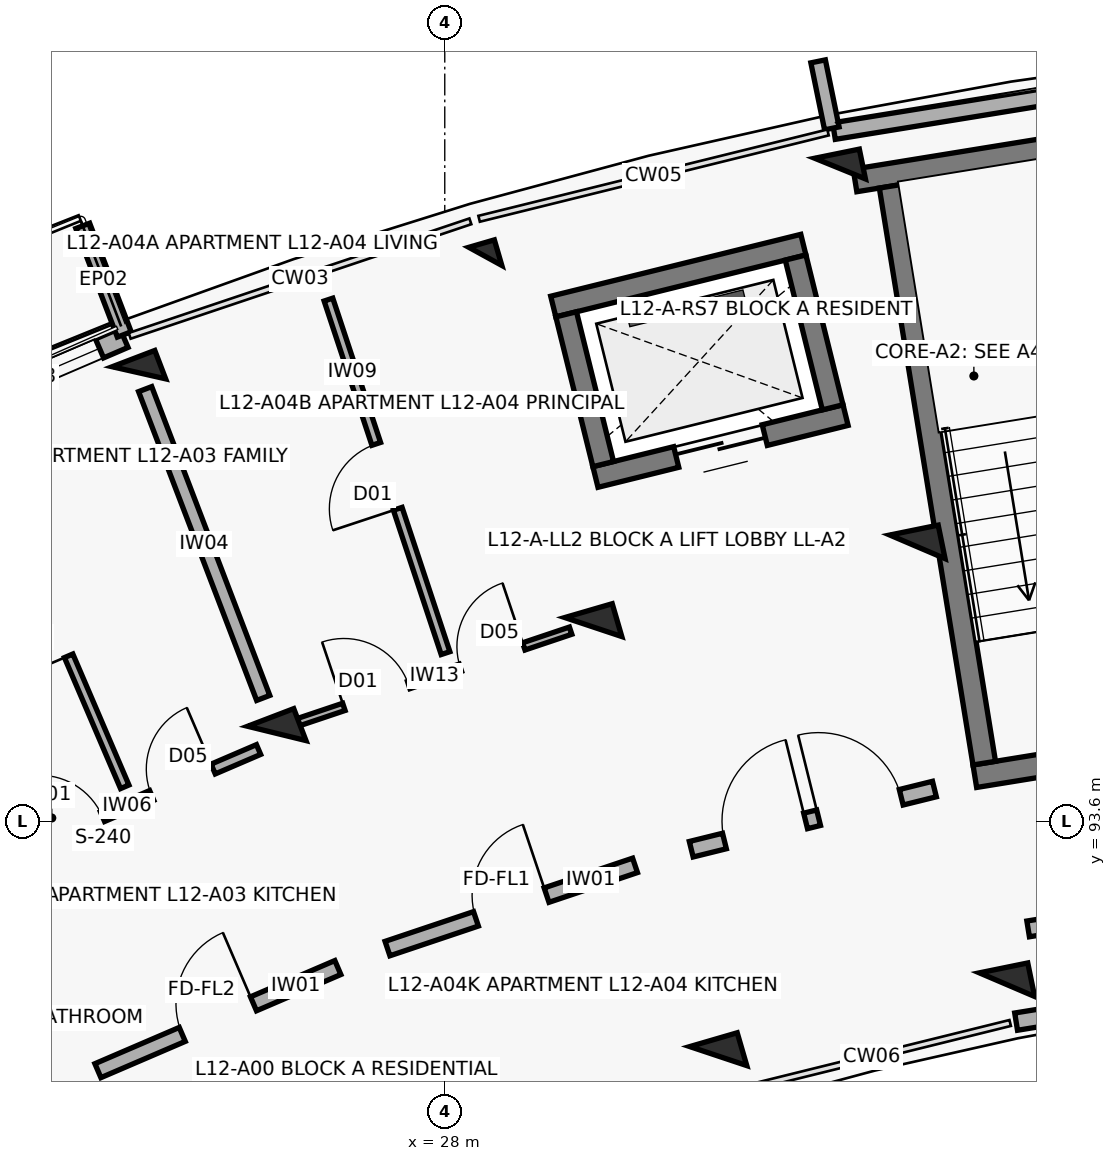
"""IFC4 building model, lengths in metres.
Left out: names, types, materials, properties, quantities, classifications, styles, units other than length and angle.
Written with IfcOpenShell. Run it as: python <this file> out.ifc"""

import sys

from ifc_helpers import new_model, si_unit, direction, frame, frame_2d, origin, origin_2d, place, context, subcontext, project, spatial, rectangle, extrude, element, fill, save


model = new_model("IFC4")
c1 = context("Model", 3, precision=1e-05, world=origin(), true_north=direction((0.0, 1.0)))
c2 = subcontext(c1, "Body", "Model", "MODEL_VIEW")
j1 = project(units=[si_unit("LENGTHUNIT", "METRE"), si_unit("PLANEANGLEUNIT", "RADIAN")], contexts=[c1])
p1 = place(None, origin())
s1 = spatial("IfcSite", under=j1, at=p1, CompositionType="ELEMENT")
p2 = place(p1, origin())
s2 = spatial("IfcBuilding", under=s1, at=p2, CompositionType="ELEMENT")
p3 = place(p2, frame((0.0, 0.0, 39.1)))
s3 = spatial("IfcBuildingStorey", under=s2, at=p3, CompositionType="ELEMENT", Elevation=39.1)
p4 = place(p3, frame((25.79, 94.753, 0.0), z_axis=(0.0, 0.0, 1.0), x_axis=(-0.357064076459, 0.934079892355, 0.0)))
e1 = element("IfcColumn", 1, at=p4, inside=s3, PredefinedType="COLUMN", context=c2, shape_type="SweptSolid", body=[
    extrude(rectangle(XDim=0.45, YDim=0.65, at=origin_2d()), origin(), (0.0, 0.0, 1.0), 3.1),
])
p5 = place(p3, frame((23.976, 99.499, 0.0), z_axis=(0.0, 0.0, 1.0), x_axis=(-0.357064076459, 0.934079892355, 0.0)))
e2 = element("IfcColumn", 2, at=p5, inside=s3, PredefinedType="COLUMN", context=c2, shape_type="SweptSolid", body=[
    extrude(rectangle(XDim=0.4, YDim=0.6, at=origin_2d()), origin(), (0.0, 0.0, 1.0), 3.1),
])
for number, where, z_axis, x_axis in (
    (3, (31.599, 90.508, 0.0), (0.0, 0.0, 1.0), (-0.28, 0.96, 0.0)),
    (4, (29.954, 96.153, 0.0), (0.0, 0.0, 1.0), (-0.28, 0.96, 0.0)),
):
    element("IfcColumn", number, at=place(p3, frame(where, z_axis=z_axis, x_axis=x_axis)), inside=s3, PredefinedType="COLUMN", context=c2, shape_type="SweptSolid", body=[
        extrude(rectangle(XDim=0.45, YDim=0.65, at=origin_2d()), origin(), (0.0, 0.0, 1.0), 3.1),
    ])
p6 = place(p3, frame((28.533, 101.031, 0.0), z_axis=(0.0, 0.0, 1.0), x_axis=(-0.27966144946, 0.96009867914, 0.0)))
e5 = element("IfcColumn", 5, at=p6, inside=s3, PredefinedType="COLUMN", context=c2, shape_type="SweptSolid", body=[
    extrude(rectangle(XDim=0.35, YDim=0.35, at=origin_2d()), origin(), (0.0, 0.0, 1.0), 3.1),
])
for number, where, z_axis, x_axis in (
    (6, (35.397, 91.448, 0.0), (0.0, 0.0, 1.0), (-0.2, 0.98, 0.0)),
    (7, (34.219, 97.209, 0.0), (0.0, 0.0, 1.0), (-0.2, 0.98, 0.0)),
):
    element("IfcColumn", number, at=place(p3, frame(where, z_axis=z_axis, x_axis=x_axis)), inside=s3, PredefinedType="COLUMN", context=c2, shape_type="SweptSolid", body=[
        extrude(rectangle(XDim=0.45, YDim=0.65, at=origin_2d()), origin(), (0.0, 0.0, 1.0), 3.1),
    ])
p7 = place(p3, frame((33.201, 102.186, 0.0), z_axis=(0.0, 0.0, 1.0), x_axis=(-0.200393999665, 0.979715389742, 0.0)))
e8 = element("IfcColumn", 8, at=p7, inside=s3, PredefinedType="COLUMN", context=c2, shape_type="SweptSolid", body=[
    extrude(rectangle(XDim=0.4, YDim=0.6, at=origin_2d()), origin(), (0.0, 0.0, 1.0), 3.1),
])
p8 = place(p3, frame((19.361, 98.059, 0.0), z_axis=(0.0, 0.0, 1.0), x_axis=(0.918711189033, 0.394930058548, 0.0)))
e9 = element("IfcWall", 9, at=p8, inside=s3, PredefinedType="SOLIDWALL", context=c2, shape_type="SweptSolid", body=[
    extrude(rectangle(XDim=4.809, YDim=0.272, at=frame_2d((2.404, 0.0))), origin(), (0.0, 0.0, 1.0), 2.25),
])
p9 = place(p8, frame((0.4, 0.0, 0.0)))
e10 = element("IfcOpeningElement", 10, at=p9, cuts=e9, PredefinedType="OPENING", context=c2, shape_type="SweptSolid", body=[
    extrude(rectangle(XDim=1.1, YDim=2.15, at=frame_2d((0.55, 1.075))), frame((0.0, 0.146, 0.0), z_axis=(0.0, -1.0, 0.0), x_axis=(1.0, 0.0, 0.0)), (0.0, 0.0, 1.0), 0.292),
])
p10 = place(p8, frame((2.659, 0.0, 0.35)))
e11 = element("IfcOpeningElement", 11, at=p10, cuts=e9, PredefinedType="OPENING", context=c2, shape_type="SweptSolid", body=[
    extrude(rectangle(XDim=1.8, YDim=1.65, at=frame_2d((0.9, 0.825))), frame((0.0, 0.146, 0.0), z_axis=(0.0, -1.0, 0.0), x_axis=(1.0, 0.0, 0.0)), (0.0, 0.0, 1.0), 0.292),
])
p11 = place(p3, frame((23.783, 100.003, 0.0), z_axis=(0.0, 0.0, 1.0), x_axis=(-0.356957296461, 0.934120703391, 0.0)))
e12 = element("IfcWall", 12, at=p11, inside=s3, PredefinedType="PARAPET", context=c2, shape_type="SweptSolid", body=[
    extrude(rectangle(XDim=1.53, YDim=0.195, at=frame_2d((0.765, 0.0))), origin(), (0.0, 0.0, 1.0), 2.25),
])
p12 = place(p3, frame((33.12, 102.679, 0.0), z_axis=(0.0, 0.0, 1.0), x_axis=(0.987080750493, 0.160223568819, 0.0)))
e13 = element("IfcWall", 13, at=p12, inside=s3, PredefinedType="SOLIDWALL", context=c2, shape_type="SweptSolid", body=[
    extrude(rectangle(XDim=4.809, YDim=0.22, at=frame_2d((2.404, 0.0))), origin(), (0.0, 0.0, 1.0), 2.25),
])
p13 = place(p3, frame((33.093, 102.715, 0.0), z_axis=(0.0, 0.0, 1.0), x_axis=(-0.200183211319, 0.979758481416, 0.0)))
e14 = element("IfcWall", 14, at=p13, inside=s3, PredefinedType="PARAPET", context=c2, shape_type="SweptSolid", body=[
    extrude(rectangle(XDim=0.9, YDim=0.195, at=frame_2d((0.45, 0.0))), origin(), (0.0, 0.0, 1.0), 2.25),
])
p14 = place(p3, frame((35.517, 90.961, 0.0), z_axis=(0.0, 0.0, 1.0), x_axis=(0.987080708519, 0.160223827412, 0.0)))
e15 = element("IfcWall", 15, at=p14, inside=s3, PredefinedType="SOLIDWALL", context=c2, shape_type="SweptSolid", body=[
    extrude(rectangle(XDim=3.832, YDim=0.23, at=frame_2d((1.916, 0.0))), origin(), (0.0, 0.0, 1.0), 2.25),
])
p15 = place(p14, frame((1.116, 0.0, 0.32)))
e16 = element("IfcOpeningElement", 16, at=p15, cuts=e15, PredefinedType="OPENING", context=c2, shape_type="SweptSolid", body=[
    extrude(rectangle(XDim=1.6, YDim=1.5, at=frame_2d((0.8, 0.75))), frame((0.0, 0.125, 0.0), z_axis=(0.0, -1.0, 0.0), x_axis=(1.0, 0.0, 0.0)), (0.0, 0.0, 1.0), 0.25),
])
p16 = place(p3, frame((38.794, 94.811, 0.0), z_axis=(0.0, 0.0, 1.0), x_axis=(-0.987077443397, -0.160243941341, 0.0)))
e17 = element("IfcWall", 17, at=p16, inside=s3, PredefinedType="SHEAR", context=c2, shape_type="SweptSolid", body=[
    extrude(rectangle(XDim=3.87, YDim=0.3, at=frame_2d((1.935, 0.0))), origin(), (0.0, 0.0, 1.0), 3.1),
])
p17 = place(p16, frame((1.41, 0.0, 0.0)))
e18 = element("IfcOpeningElement", 18, at=p17, cuts=e17, PredefinedType="OPENING", context=c2, shape_type="SweptSolid", body=[
    extrude(rectangle(XDim=1.05, YDim=2.15, at=frame_2d((0.525, 1.075))), frame((0.0, 0.16, 0.0), z_axis=(0.0, -1.0, 0.0), x_axis=(1.0, 0.0, 0.0)), (0.0, 0.0, 1.0), 0.32),
])
p18 = place(p3, frame((37.81, 102.745, 0.0), z_axis=(0.0, 0.0, 1.0), x_axis=(-0.987084710126, -0.160199173019, 0.0)))
e19 = element("IfcWall", 19, at=p18, inside=s3, PredefinedType="SHEAR", context=c2, shape_type="SweptSolid", body=[
    extrude(rectangle(XDim=4.47, YDim=0.3, at=frame_2d((2.235, 0.0))), origin(), (0.0, 0.0, 1.0), 3.1),
])
p19 = place(p3, frame((35.098, 94.363, 0.0), z_axis=(0.0, 0.0, 1.0), x_axis=(-0.160227496777, 0.987080112897, 0.0)))
e20 = element("IfcWall", 20, at=p19, inside=s3, PredefinedType="SHEAR", context=c2, shape_type="SweptSolid", body=[
    extrude(rectangle(XDim=7.69, YDim=0.3, at=frame_2d((3.845, 0.0))), origin(), (0.0, 0.0, 1.0), 3.1),
])
p20 = place(p3, frame((33.273, 98.942, 0.0), z_axis=(0.0, 0.0, 1.0), x_axis=(-0.970707542441, -0.240264160972, 0.0)))
e21 = element("IfcWall", 21, at=p20, inside=s3, PredefinedType="SHEAR", context=c2, shape_type="SweptSolid", body=[
    extrude(rectangle(XDim=3.39, YDim=0.28, at=frame_2d((1.695, 0.0))), origin(), (0.0, 0.0, 1.0), 3.1),
])
p21 = place(p20, frame((1.095, 0.0, 0.0)))
e22 = element("IfcOpeningElement", 22, at=p21, cuts=e21, PredefinedType="OPENING", context=c2, shape_type="SweptSolid", body=[
    extrude(rectangle(XDim=1.2, YDim=2.15, at=frame_2d((0.6, 1.075))), frame((0.0, 0.15, 0.0), z_axis=(0.0, -1.0, 0.0), x_axis=(1.0, 0.0, 0.0)), (0.0, 0.0, 1.0), 0.3),
])
p22 = place(p3, frame((32.718, 101.185, 0.0), z_axis=(0.0, 0.0, 1.0), x_axis=(-0.970711699588, -0.240247364777, 0.0)))
e23 = element("IfcWall", 23, at=p22, inside=s3, PredefinedType="SHEAR", context=c2, shape_type="SweptSolid", body=[
    extrude(rectangle(XDim=3.39, YDim=0.28, at=frame_2d((1.695, 0.0))), origin(), (0.0, 0.0, 1.0), 3.1),
])
p23 = place(p3, frame((33.104, 99.044, 0.0), z_axis=(0.0, 0.0, 1.0), x_axis=(-0.240186044774, 0.970726873995, 0.0)))
e24 = element("IfcWall", 24, at=p23, inside=s3, PredefinedType="SHEAR", context=c2, shape_type="SweptSolid", body=[
    extrude(rectangle(XDim=2.03, YDim=0.28, at=frame_2d((1.015, 0.0))), origin(), (0.0, 0.0, 1.0), 3.1),
])
p24 = place(p3, frame((30.085, 98.297, 0.0), z_axis=(0.0, 0.0, 1.0), x_axis=(-0.2402993748, 0.970698825832, 0.0)))
e25 = element("IfcWall", 25, at=p24, inside=s3, PredefinedType="SHEAR", context=c2, shape_type="SweptSolid", body=[
    extrude(rectangle(XDim=2.03, YDim=0.28, at=frame_2d((1.015, 0.0))), origin(), (0.0, 0.0, 1.0), 3.1),
])
p25 = place(p3, frame((23.437, 90.316, 0.0), z_axis=(0.0, 0.0, 1.0), x_axis=(0.918718172399, 0.394913813008, 0.0)))
e26 = element("IfcWall", 26, at=p25, inside=s3, PredefinedType="SOLIDWALL", context=c2, shape_type="SweptSolid", body=[
    extrude(rectangle(XDim=3.436, YDim=0.2, at=frame_2d((1.718, 0.0))), origin(), (0.0, 0.0, 1.0), 2.08),
])
p26 = place(p25, frame((1.208, 0.0, 0.0)))
e27 = element("IfcOpeningElement", 27, at=p26, cuts=e26, PredefinedType="OPENING", context=c2, shape_type="SweptSolid", body=[
    extrude(rectangle(XDim=1.02, YDim=2.15, at=frame_2d((0.51, 1.075))), frame((0.0, 0.11, 0.0), z_axis=(0.0, -1.0, 0.0), x_axis=(1.0, 0.0, 0.0)), (0.0, 0.0, 1.0), 0.22),
])
p27 = place(p3, frame((22.073, 93.047, 0.0), z_axis=(0.0, 0.0, 1.0), x_axis=(0.918737522346, 0.394868794707, 0.0)))
e28 = element("IfcWall", 28, at=p27, inside=s3, PredefinedType="PARTITIONING", context=c2, shape_type="SweptSolid", body=[
    extrude(rectangle(XDim=3.785, YDim=0.14, at=frame_2d((1.893, 0.0))), origin(), (0.0, 0.0, 1.0), 2.08),
])
p28 = place(p27, frame((0.65, 0.0, 0.0)))
e29 = element("IfcOpeningElement", 29, at=p28, cuts=e28, PredefinedType="OPENING", context=c2, shape_type="SweptSolid", body=[
    extrude(rectangle(XDim=0.9, YDim=2.1, at=frame_2d((0.45, 1.05))), frame((0.0, 0.08, 0.0), z_axis=(0.0, -1.0, 0.0), x_axis=(1.0, 0.0, 0.0)), (0.0, 0.0, 1.0), 0.16),
])
p29 = place(p27, frame((2.255, 0.0, 0.0)))
e30 = element("IfcOpeningElement", 30, at=p29, cuts=e28, PredefinedType="OPENING", context=c2, shape_type="SweptSolid", body=[
    extrude(rectangle(XDim=0.88, YDim=2.1, at=frame_2d((0.44, 1.05))), frame((0.0, 0.08, 0.0), z_axis=(0.0, -1.0, 0.0), x_axis=(1.0, 0.0, 0.0)), (0.0, 0.0, 1.0), 0.16),
])
p30 = place(p3, frame((23.789, 94.051, 0.0), z_axis=(0.0, 0.0, 1.0), x_axis=(-0.393539995583, 0.919307495823, 0.0)))
e31 = element("IfcWall", 31, at=p30, inside=s3, PredefinedType="PARTITIONING", context=c2, shape_type="SweptSolid", body=[
    extrude(rectangle(XDim=5.05, YDim=0.12, at=frame_2d((2.525, 0.0))), origin(), (0.0, 0.0, 1.0), 2.08),
])
p31 = place(p30, frame((1.875, 0.0, 0.0)))
e32 = element("IfcOpeningElement", 32, at=p31, cuts=e31, PredefinedType="OPENING", context=c2, shape_type="SweptSolid", body=[
    extrude(rectangle(XDim=1.3, YDim=2.1, at=frame_2d((0.65, 1.05))), frame((0.0, 0.07, 0.0), z_axis=(0.0, -1.0, 0.0), x_axis=(1.0, 0.0, 0.0)), (0.0, 0.0, 1.0), 0.14),
])
p32 = place(p3, frame((27.247, 91.923, 0.0), z_axis=(0.0, 0.0, 1.0), x_axis=(0.947863007629, 0.318678080151, 0.0)))
e33 = element("IfcWall", 33, at=p32, inside=s3, PredefinedType="SOLIDWALL", context=c2, shape_type="SweptSolid", body=[
    extrude(rectangle(XDim=3.436, YDim=0.2, at=frame_2d((1.718, 0.0))), origin(), (0.0, 0.0, 1.0), 2.08),
])
p33 = place(p32, frame((1.228, 0.0, 0.0)))
e34 = element("IfcOpeningElement", 34, at=p33, cuts=e33, PredefinedType="OPENING", context=c2, shape_type="SweptSolid", body=[
    extrude(rectangle(XDim=0.98, YDim=2.15, at=frame_2d((0.49, 1.075))), frame((0.0, 0.11, 0.0), z_axis=(0.0, -1.0, 0.0), x_axis=(1.0, 0.0, 0.0)), (0.0, 0.0, 1.0), 0.22),
])
p34 = place(p3, frame((26.056, 94.896, 0.0), z_axis=(0.0, 0.0, 1.0), x_axis=(0.947876567739, 0.318637744673, 0.0)))
e35 = element("IfcWall", 35, at=p34, inside=s3, PredefinedType="PARTITIONING", context=c2, shape_type="SweptSolid", body=[
    extrude(rectangle(XDim=3.797, YDim=0.1, at=frame_2d((1.899, 0.0))), origin(), (0.0, 0.0, 1.0), 2.08),
])
p35 = place(p34, frame((0.65, 0.0, 0.0)))
e36 = element("IfcOpeningElement", 36, at=p35, cuts=e35, PredefinedType="OPENING", context=c2, shape_type="SweptSolid", body=[
    extrude(rectangle(XDim=0.9, YDim=2.1, at=frame_2d((0.45, 1.05))), frame((0.0, 0.06, 0.0), z_axis=(0.0, -1.0, 0.0), x_axis=(1.0, 0.0, 0.0)), (0.0, 0.0, 1.0), 0.12),
])
p36 = place(p34, frame((2.267, 0.0, 0.0)))
e37 = element("IfcOpeningElement", 37, at=p36, cuts=e35, PredefinedType="OPENING", context=c2, shape_type="SweptSolid", body=[
    extrude(rectangle(XDim=0.88, YDim=2.1, at=frame_2d((0.44, 1.05))), frame((0.0, 0.06, 0.0), z_axis=(0.0, -1.0, 0.0), x_axis=(1.0, 0.0, 0.0)), (0.0, 0.0, 1.0), 0.12),
])
p37 = place(p3, frame((28.01, 95.81, 0.0), z_axis=(0.0, 0.0, 1.0), x_axis=(-0.314343770763, 0.949309219266, 0.0)))
e38 = element("IfcWall", 38, at=p37, inside=s3, PredefinedType="PARTITIONING", context=c2, shape_type="SweptSolid", body=[
    extrude(rectangle(XDim=4.9, YDim=0.12, at=frame_2d((2.45, 0.0))), origin(), (0.0, 0.0, 1.0), 2.08),
])
p38 = place(p37, frame((2.0, 0.0, 0.0)))
e39 = element("IfcOpeningElement", 39, at=p38, cuts=e38, PredefinedType="OPENING", context=c2, shape_type="SweptSolid", body=[
    extrude(rectangle(XDim=0.9, YDim=2.1, at=frame_2d((0.45, 1.05))), frame((0.0, 0.07, 0.0), z_axis=(0.0, -1.0, 0.0), x_axis=(1.0, 0.0, 0.0)), (0.0, 0.0, 1.0), 0.14),
])
p39 = place(p3, frame((25.611, 95.22, 0.0), z_axis=(0.0, 0.0, 1.0), x_axis=(-0.357064016205, 0.934079915388, 0.0)))
e40 = element("IfcWall", 40, at=p39, inside=s3, PredefinedType="SOLIDWALL", context=c2, shape_type="SweptSolid", body=[
    extrude(rectangle(XDim=4.35, YDim=0.185, at=frame_2d((2.175, 0.0))), origin(), (0.0, 0.0, 1.0), 2.08),
])
p40 = place(p3, frame((31.243, 93.23, 0.0), z_axis=(0.0, 0.0, 1.0), x_axis=(0.970719238682, 0.240216901263, 0.0)))
e41 = element("IfcWall", 41, at=p40, inside=s3, PredefinedType="SOLIDWALL", context=c2, shape_type="SweptSolid", body=[
    extrude(rectangle(XDim=3.296, YDim=0.21, at=frame_2d((1.648, 0.0))), origin(), (0.0, 0.0, 1.0), 2.08),
])
p41 = place(p40, frame((0.45, 0.0, 0.0)))
e42 = element("IfcOpeningElement", 42, at=p41, cuts=e41, PredefinedType="OPENING", context=c2, shape_type="SweptSolid", body=[
    extrude(rectangle(XDim=1.1, YDim=2.15, at=frame_2d((0.55, 1.075))), frame((0.0, 0.115, 0.0), z_axis=(0.0, -1.0, 0.0), x_axis=(1.0, 0.0, 0.0)), (0.0, 0.0, 1.0), 0.23),
])
p42 = place(p40, frame((1.726, 0.0, 0.0)))
e43 = element("IfcOpeningElement", 43, at=p42, cuts=e41, PredefinedType="OPENING", context=c2, shape_type="SweptSolid", body=[
    extrude(rectangle(XDim=1.12, YDim=2.15, at=frame_2d((0.56, 1.075))), frame((0.0, 0.115, 0.0), z_axis=(0.0, -1.0, 0.0), x_axis=(1.0, 0.0, 0.0)), (0.0, 0.0, 1.0), 0.23),
])
p43 = place(p3, frame((35.676, 92.181, 0.0), z_axis=(0.0, 0.0, 1.0), x_axis=(0.98707079686, 0.160284877599, 0.0)))
e44 = element("IfcWall", 44, at=p43, inside=s3, PredefinedType="SOLIDWALL", context=c2, shape_type="SweptSolid", body=[
    extrude(rectangle(XDim=3.129, YDim=0.21, at=frame_2d((1.564, 0.0))), origin(), (0.0, 0.0, 1.0), 2.08),
])
p44 = place(p43, frame((1.014, 0.0, 0.0)))
e45 = element("IfcOpeningElement", 45, at=p44, cuts=e44, PredefinedType="OPENING", context=c2, shape_type="SweptSolid", body=[
    extrude(rectangle(XDim=1.1, YDim=2.15, at=frame_2d((0.55, 1.075))), frame((0.0, 0.115, 0.0), z_axis=(0.0, -1.0, 0.0), x_axis=(1.0, 0.0, 0.0)), (0.0, 0.0, 1.0), 0.23),
])
p45 = place(p10, origin())
e46 = element("IfcWindow", 46, at=p45, inside=s3, PartitioningType="TRIPLE_PANEL_VERTICAL", PredefinedType="WINDOW", context=c2, shape_type="SweptSolid", body=[
    extrude(rectangle(XDim=1.8, YDim=1.65, at=frame_2d((0.9, 0.825))), frame((0.0, 0.03, 0.0), z_axis=(0.0, -1.0, 0.0), x_axis=(1.0, 0.0, 0.0)), (0.0, 0.0, 1.0), 0.06),
])
fill(e11, e46)
p46 = place(p21, origin())
e47 = element("IfcDoor", 47, at=p46, inside=s3, OperationType="DOUBLE_DOOR_SLIDING", PredefinedType="DOOR", context=c2, shape_type="SweptSolid", body=[
    extrude(rectangle(XDim=1.2, YDim=2.15, at=frame_2d((0.6, 1.075))), frame((0.0, 0.025, 0.0), z_axis=(0.0, -1.0, 0.0), x_axis=(1.0, 0.0, 0.0)), (0.0, 0.0, 1.0), 0.05),
])
fill(e22, e47)
p47 = place(p26, origin())
e48 = element("IfcDoor", 48, at=p47, inside=s3, OperationType="SINGLE_SWING_RIGHT", PredefinedType="DOOR", context=c2, shape_type="SweptSolid", body=[
    extrude(rectangle(XDim=1.02, YDim=2.15, at=frame_2d((0.51, 1.075))), frame((0.0, 0.025, 0.0), z_axis=(0.0, -1.0, 0.0), x_axis=(1.0, 0.0, 0.0)), (0.0, 0.0, 1.0), 0.05),
])
fill(e27, e48)
p48 = place(p28, origin())
e49 = element("IfcDoor", 49, at=p48, inside=s3, OperationType="SINGLE_SWING_LEFT", PredefinedType="DOOR", context=c2, shape_type="SweptSolid", body=[
    extrude(rectangle(XDim=0.9, YDim=2.1, at=frame_2d((0.45, 1.05))), frame((0.0, 0.025, 0.0), z_axis=(0.0, -1.0, 0.0), x_axis=(1.0, 0.0, 0.0)), (0.0, 0.0, 1.0), 0.05),
])
fill(e29, e49)
p49 = place(p29, origin())
e50 = element("IfcDoor", 50, at=p49, inside=s3, OperationType="SINGLE_SWING_RIGHT", PredefinedType="DOOR", context=c2, shape_type="SweptSolid", body=[
    extrude(rectangle(XDim=0.88, YDim=2.1, at=frame_2d((0.44, 1.05))), frame((0.0, 0.025, 0.0), z_axis=(0.0, -1.0, 0.0), x_axis=(1.0, 0.0, 0.0)), (0.0, 0.0, 1.0), 0.05),
])
fill(e30, e50)
p50 = place(p31, origin())
e51 = element("IfcDoor", 51, at=p50, inside=s3, OperationType="SINGLE_SWING_LEFT", PredefinedType="DOOR", context=c2, shape_type="SweptSolid", body=[
    extrude(rectangle(XDim=1.3, YDim=2.1, at=frame_2d((0.65, 1.05))), frame((0.0, 0.025, 0.0), z_axis=(0.0, -1.0, 0.0), x_axis=(1.0, 0.0, 0.0)), (0.0, 0.0, 1.0), 0.05),
])
fill(e32, e51)
p51 = place(p33, origin())
e52 = element("IfcDoor", 52, at=p51, inside=s3, OperationType="SINGLE_SWING_RIGHT", PredefinedType="DOOR", context=c2, shape_type="SweptSolid", body=[
    extrude(rectangle(XDim=0.98, YDim=2.15, at=frame_2d((0.49, 1.075))), frame((0.0, 0.025, 0.0), z_axis=(0.0, -1.0, 0.0), x_axis=(1.0, 0.0, 0.0)), (0.0, 0.0, 1.0), 0.05),
])
fill(e34, e52)
p52 = place(p35, origin())
e53 = element("IfcDoor", 53, at=p52, inside=s3, OperationType="SINGLE_SWING_LEFT", PredefinedType="DOOR", context=c2, shape_type="SweptSolid", body=[
    extrude(rectangle(XDim=0.9, YDim=2.1, at=frame_2d((0.45, 1.05))), frame((0.0, 0.025, 0.0), z_axis=(0.0, -1.0, 0.0), x_axis=(1.0, 0.0, 0.0)), (0.0, 0.0, 1.0), 0.05),
])
fill(e36, e53)
p53 = place(p36, origin())
e54 = element("IfcDoor", 54, at=p53, inside=s3, OperationType="SINGLE_SWING_RIGHT", PredefinedType="DOOR", context=c2, shape_type="SweptSolid", body=[
    extrude(rectangle(XDim=0.88, YDim=2.1, at=frame_2d((0.44, 1.05))), frame((0.0, 0.025, 0.0), z_axis=(0.0, -1.0, 0.0), x_axis=(1.0, 0.0, 0.0)), (0.0, 0.0, 1.0), 0.05),
])
fill(e37, e54)
p54 = place(p38, origin())
e55 = element("IfcDoor", 55, at=p54, inside=s3, OperationType="SINGLE_SWING_LEFT", PredefinedType="DOOR", context=c2, shape_type="SweptSolid", body=[
    extrude(rectangle(XDim=0.9, YDim=2.1, at=frame_2d((0.45, 1.05))), frame((0.0, 0.025, 0.0), z_axis=(0.0, -1.0, 0.0), x_axis=(1.0, 0.0, 0.0)), (0.0, 0.0, 1.0), 0.05),
])
fill(e39, e55)
p55 = place(p41, origin())
e56 = element("IfcDoor", 56, at=p55, inside=s3, OperationType="SINGLE_SWING_RIGHT", PredefinedType="DOOR", context=c2, shape_type="SweptSolid", body=[
    extrude(rectangle(XDim=1.1, YDim=2.15, at=frame_2d((0.55, 1.075))), frame((0.0, 0.025, 0.0), z_axis=(0.0, -1.0, 0.0), x_axis=(1.0, 0.0, 0.0)), (0.0, 0.0, 1.0), 0.05),
])
fill(e42, e56)
p56 = place(p42, origin())
e57 = element("IfcDoor", 57, at=p56, inside=s3, OperationType="SINGLE_SWING_LEFT", PredefinedType="DOOR", context=c2, shape_type="SweptSolid", body=[
    extrude(rectangle(XDim=1.12, YDim=2.15, at=frame_2d((0.56, 1.075))), frame((0.0, 0.025, 0.0), z_axis=(0.0, -1.0, 0.0), x_axis=(1.0, 0.0, 0.0)), (0.0, 0.0, 1.0), 0.05),
])
fill(e43, e57)
save(model, sys.argv[1])
